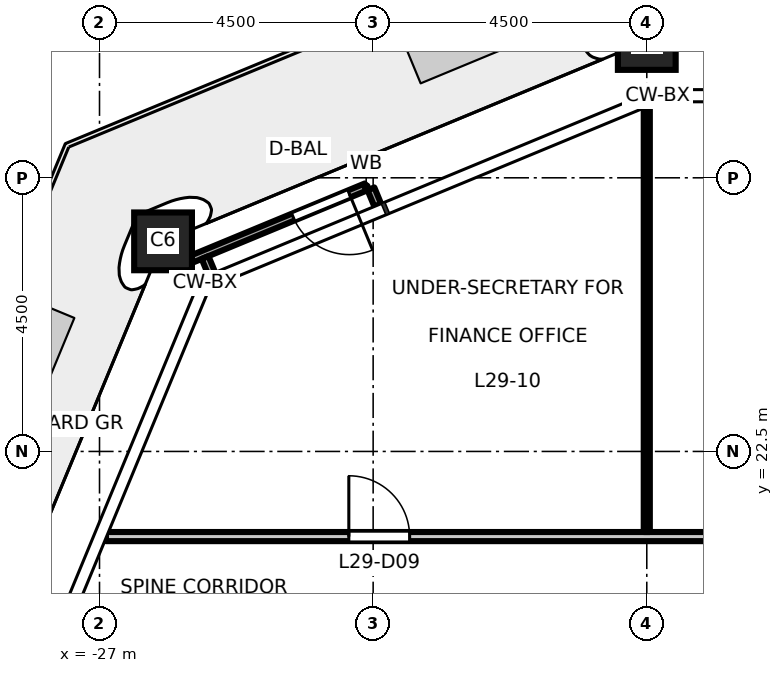
"""IFC4 building model, lengths in metres.
Left out: names, types, materials, properties, quantities, classifications, styles, units other than length and angle.
Written with IfcOpenShell. Run it as: python <this file> out.ifc"""

import sys

from ifc_helpers import new_model, si_unit, direction, frame, frame_2d, origin, origin_2d, place, context, subcontext, project, spatial, rectangle, hollow_rectangle, extrude, element, fill, save


model = new_model("IFC4")
c1 = context("Model", 3, precision=1e-05, world=origin(), true_north=direction((0.0, 1.0)))
c2 = subcontext(c1, "Body", "Model", "MODEL_VIEW")
j1 = project(units=[si_unit("LENGTHUNIT", "METRE"), si_unit("PLANEANGLEUNIT", "RADIAN")], contexts=[c1])
p1 = place(None, origin())
s1 = spatial("IfcSite", under=j1, at=p1, CompositionType="ELEMENT")
p2 = place(p1, origin())
s2 = spatial("IfcBuilding", under=s1, at=p2, CompositionType="ELEMENT")
p3 = place(p2, frame((0.0, 0.0, 136.2)))
s3 = spatial("IfcBuildingStorey", under=s2, at=p3, CompositionType="ELEMENT", Elevation=136.2)
for number, where, z_axis, x_axis in (
    (1, (-18.0, 29.25, 0.0), (0.0, 0.0, 1.0), (1.0, 0.0, 0.0)),
    (2, (-25.955, 25.955, 0.0), (0.0, 0.0, 1.0), (1.0, 0.0, 0.0)),
):
    element("IfcColumn", number, at=place(p3, frame(where, z_axis=z_axis, x_axis=x_axis)), inside=s3, PredefinedType="COLUMN", context=c2, shape_type="SweptSolid", body=[
        extrude(hollow_rectangle(XDim=0.95, YDim=0.95, WallThickness=0.055, at=origin_2d()), origin(), (0.0, 0.0, 1.0), 4.5),
    ])
for number, where, z_axis, x_axis in (
    (3, (-22.425, 26.551, 0.0), (0.0, 0.0, 1.0), (-0.382, 0.924, 0.0)),
    (4, (-25.153, 25.421, 0.0), (0.0, 0.0, 1.0), (-0.383, 0.924, 0.0)),
):
    element("IfcWall", number, at=place(p3, frame(where, z_axis=z_axis, x_axis=x_axis)), inside=s3, PredefinedType="STANDARD", context=c2, shape_type="SweptSolid", body=[
        extrude(rectangle(XDim=0.29, YDim=0.12, at=frame_2d((0.145, 0.0))), origin(), (0.0, 0.0, 1.0), 4.35),
    ])
p4 = place(p3, frame((-22.615, 26.852, 0.0), z_axis=(0.0, 0.0, 1.0), x_axis=(-0.923869084389, -0.382708655389, 0.0)))
e5 = element("IfcWall", 5, at=p4, inside=s3, PredefinedType="STANDARD", context=c2, shape_type="SweptSolid", body=[
    extrude(rectangle(XDim=3.102, YDim=0.12, at=frame_2d((1.551, 0.0))), origin(), (0.0, 0.0, 1.0), 4.35),
])
p5 = place(p4, frame((0.3, 0.0, 0.0)))
e6 = element("IfcOpeningElement", 6, at=p5, cuts=e5, PredefinedType="OPENING", context=c2, shape_type="SweptSolid", body=[
    extrude(rectangle(XDim=1.0, YDim=2.4, at=frame_2d((0.5, 1.2))), frame((0.0, 0.07, 0.0), z_axis=(0.0, -1.0, 0.0), x_axis=(1.0, 0.0, 0.0)), (0.0, 0.0, 1.0), 0.14),
])
p6 = place(p3, frame((-26.894, 21.1, 0.0), z_axis=(0.0, 0.0, 1.0), x_axis=(1.0, 0.0, 0.0)))
e7 = element("IfcWall", 7, at=p6, inside=s3, PredefinedType="PARTITIONING", context=c2, shape_type="SweptSolid", body=[
    extrude(rectangle(XDim=53.788, YDim=0.15, at=frame_2d((26.894, 0.0))), origin(), (0.0, 0.0, 1.0), 4.35),
])
p7 = place(p6, frame((12.994, 0.0, 0.0)))
e8 = element("IfcOpeningElement", 8, at=p7, cuts=e7, PredefinedType="OPENING", context=c2, shape_type="SweptSolid", body=[
    extrude(rectangle(XDim=1.0, YDim=2.1, at=frame_2d((0.5, 1.05))), frame((0.0, 0.085, 0.0), z_axis=(0.0, -1.0, 0.0), x_axis=(1.0, 0.0, 0.0)), (0.0, 0.0, 1.0), 0.17),
])
p8 = place(p6, frame((21.994, 0.0, 0.0)))
e9 = element("IfcOpeningElement", 9, at=p8, cuts=e7, PredefinedType="OPENING", context=c2, shape_type="SweptSolid", body=[
    extrude(rectangle(XDim=1.0, YDim=2.1, at=frame_2d((0.5, 1.05))), frame((0.0, 0.085, 0.0), z_axis=(0.0, -1.0, 0.0), x_axis=(1.0, 0.0, 0.0)), (0.0, 0.0, 1.0), 0.17),
])
p9 = place(p6, frame((30.994, 0.0, 0.0)))
e10 = element("IfcOpeningElement", 10, at=p9, cuts=e7, PredefinedType="OPENING", context=c2, shape_type="SweptSolid", body=[
    extrude(rectangle(XDim=1.0, YDim=2.1, at=frame_2d((0.5, 1.05))), frame((0.0, 0.085, 0.0), z_axis=(0.0, -1.0, 0.0), x_axis=(1.0, 0.0, 0.0)), (0.0, 0.0, 1.0), 0.17),
])
p10 = place(p6, frame((39.994, 0.0, 0.0)))
e11 = element("IfcOpeningElement", 11, at=p10, cuts=e7, PredefinedType="OPENING", context=c2, shape_type="SweptSolid", body=[
    extrude(rectangle(XDim=1.0, YDim=2.1, at=frame_2d((0.5, 1.05))), frame((0.0, 0.085, 0.0), z_axis=(0.0, -1.0, 0.0), x_axis=(1.0, 0.0, 0.0)), (0.0, 0.0, 1.0), 0.17),
])
p11 = place(p6, frame((3.994, 0.0, 0.0)))
e12 = element("IfcOpeningElement", 12, at=p11, cuts=e7, PredefinedType="OPENING", context=c2, shape_type="SweptSolid", body=[
    extrude(rectangle(XDim=1.0, YDim=2.1, at=frame_2d((0.5, 1.05))), frame((0.0, 0.085, 0.0), z_axis=(0.0, -1.0, 0.0), x_axis=(1.0, 0.0, 0.0)), (0.0, 0.0, 1.0), 0.17),
])
p12 = place(p6, frame((48.888, 0.0, 0.0)))
e13 = element("IfcOpeningElement", 13, at=p12, cuts=e7, PredefinedType="OPENING", context=c2, shape_type="SweptSolid", body=[
    extrude(rectangle(XDim=1.0, YDim=2.1, at=frame_2d((0.5, 1.05))), frame((0.0, 0.085, 0.0), z_axis=(0.0, -1.0, 0.0), x_axis=(1.0, 0.0, 0.0)), (0.0, 0.0, 1.0), 0.17),
])
p13 = place(p3, frame((-18.0, 21.175, 0.0), z_axis=(0.0, 0.0, 1.0), x_axis=(0.0, 1.0, 0.0)))
e14 = element("IfcWall", 14, at=p13, inside=s3, PredefinedType="PARTITIONING", context=c2, shape_type="SweptSolid", body=[
    extrude(rectangle(XDim=7.003, YDim=0.1, at=frame_2d((3.501, 0.0))), origin(), (0.0, 0.0, 1.0), 3.45),
])
p14 = place(p5, origin())
e15 = element("IfcDoor", 15, at=p14, inside=s3, OperationType="SINGLE_SWING_LEFT", PredefinedType="DOOR", context=c2, shape_type="SweptSolid", body=[
    extrude(rectangle(XDim=1.0, YDim=2.4, at=frame_2d((0.5, 1.2))), frame((0.0, 0.025, 0.0), z_axis=(0.0, -1.0, 0.0), x_axis=(1.0, 0.0, 0.0)), (0.0, 0.0, 1.0), 0.05),
])
fill(e6, e15)
p15 = place(p11, origin())
e16 = element("IfcDoor", 16, at=p15, inside=s3, OperationType="SINGLE_SWING_LEFT", PredefinedType="DOOR", context=c2, shape_type="SweptSolid", body=[
    extrude(rectangle(XDim=1.0, YDim=2.1, at=frame_2d((0.5, 1.05))), frame((0.0, 0.025, 0.0), z_axis=(0.0, -1.0, 0.0), x_axis=(1.0, 0.0, 0.0)), (0.0, 0.0, 1.0), 0.05),
])
fill(e12, e16)
save(model, sys.argv[1])
